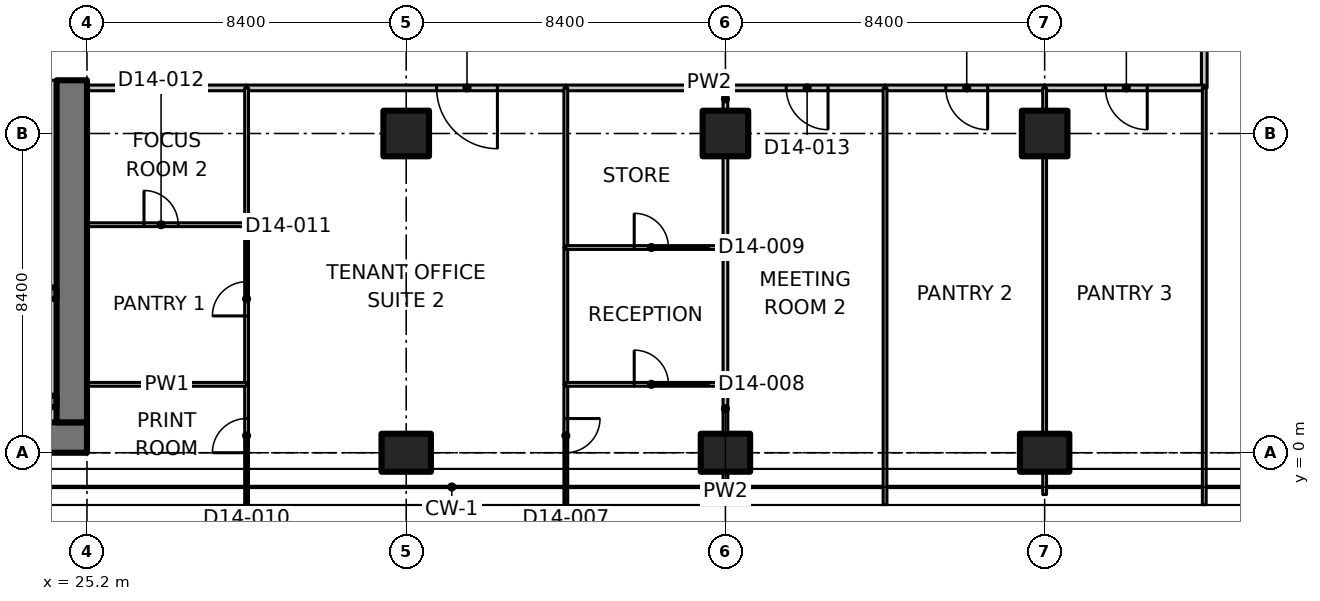
"""IFC4 building model, lengths in metres.
Left out: names, types, materials, properties, quantities, classifications, styles, units other than length and angle.
Written with IfcOpenShell. Run it as: python <this file> out.ifc"""

import sys

from ifc_helpers import new_model, si_unit, direction, frame, frame_2d, origin, origin_2d, place, context, subcontext, project, spatial, polyline, rectangle, outline, extrude, element, fill, save


model = new_model("IFC4")
c1 = context("Model", 3, precision=1e-05, world=origin(), true_north=direction((0.0, 1.0)))
c2 = subcontext(c1, "Body", "Model", "MODEL_VIEW")
j1 = project(units=[si_unit("LENGTHUNIT", "METRE"), si_unit("PLANEANGLEUNIT", "RADIAN")], contexts=[c1])
p1 = place(None, origin())
s1 = spatial("IfcSite", under=j1, at=p1, CompositionType="ELEMENT")
p2 = place(p1, origin())
s2 = spatial("IfcBuilding", under=s1, at=p2, CompositionType="ELEMENT")
p3 = place(p2, frame((0.0, 0.0, 109.7)))
s3 = spatial("IfcBuildingStorey", under=s2, at=p3, CompositionType="ELEMENT", Elevation=109.7)
p4 = place(p3, frame((33.6, 0.0, 0.0), z_axis=(0.0, 0.0, 1.0), x_axis=(0.0, 1.0, 0.0)))
e1 = element("IfcColumn", 1, at=p4, inside=s3, PredefinedType="COLUMN", context=c2, shape_type="SweptSolid", body=[
    extrude(rectangle(XDim=1.0, YDim=1.3, at=origin_2d()), origin(), (0.0, 0.0, 1.0), 3.35),
])
p5 = place(p3, frame((33.6, 8.4, 0.0), z_axis=(0.0, 0.0, 1.0), x_axis=(1.0, 0.0, 0.0)))
e2 = element("IfcColumn", 2, at=p5, inside=s3, PredefinedType="COLUMN", context=c2, shape_type="SweptSolid", body=[
    extrude(rectangle(XDim=1.2, YDim=1.2, at=origin_2d()), origin(), (0.0, 0.0, 1.0), 3.35),
])
p6 = place(p3, frame((42.0, 0.0, 0.0), z_axis=(0.0, 0.0, 1.0), x_axis=(0.0, 1.0, 0.0)))
e3 = element("IfcColumn", 3, at=p6, inside=s3, PredefinedType="COLUMN", context=c2, shape_type="SweptSolid", body=[
    extrude(rectangle(XDim=1.0, YDim=1.3, at=origin_2d()), origin(), (0.0, 0.0, 1.0), 3.35),
])
p7 = place(p3, frame((42.0, 8.4, 0.0), z_axis=(0.0, 0.0, 1.0), x_axis=(1.0, 0.0, 0.0)))
e4 = element("IfcColumn", 4, at=p7, inside=s3, PredefinedType="COLUMN", context=c2, shape_type="SweptSolid", body=[
    extrude(rectangle(XDim=1.2, YDim=1.2, at=origin_2d()), origin(), (0.0, 0.0, 1.0), 3.35),
])
p8 = place(p3, frame((50.4, 0.0, 0.0), z_axis=(0.0, 0.0, 1.0), x_axis=(0.0, 1.0, 0.0)))
e5 = element("IfcColumn", 5, at=p8, inside=s3, PredefinedType="COLUMN", context=c2, shape_type="SweptSolid", body=[
    extrude(rectangle(XDim=1.0, YDim=1.3, at=origin_2d()), origin(), (0.0, 0.0, 1.0), 3.35),
])
p9 = place(p3, frame((50.4, 8.4, 0.0), z_axis=(0.0, 0.0, 1.0), x_axis=(1.0, 0.0, 0.0)))
e6 = element("IfcColumn", 6, at=p9, inside=s3, PredefinedType="COLUMN", context=c2, shape_type="SweptSolid", body=[
    extrude(rectangle(XDim=1.2, YDim=1.2, at=origin_2d()), origin(), (0.0, 0.0, 1.0), 3.35),
])
p10 = place(p3, frame((7.136, 0.4, 0.0), z_axis=(0.0, 0.0, 1.0), x_axis=(1.0, 0.0, 0.0)))
e7 = element("IfcWall", 7, at=p10, inside=s3, PredefinedType="SHEAR", context=c2, shape_type="SweptSolid", body=[
    extrude(rectangle(XDim=18.063, YDim=0.8, at=frame_2d((9.032, 0.0))), origin(), (0.0, 0.0, 1.0), 3.35),
])
p11 = place(p3, frame((24.8, 0.8, 0.0), z_axis=(0.0, 0.0, 1.0), x_axis=(0.0, 1.0, 0.0)))
e8 = element("IfcWall", 8, at=p11, inside=s3, PredefinedType="SHEAR", context=c2, shape_type="SweptSolid", body=[
    extrude(rectangle(XDim=9.0, YDim=0.8, at=frame_2d((4.5, 0.0))), origin(), (0.0, 0.0, 1.0), 3.35),
])
p12 = place(p3, frame((15.8, 1.35, 0.0), z_axis=(0.0, 0.0, 1.0), x_axis=(1.0, 0.0, 0.0)))
e9 = element("IfcWall", 9, at=p12, inside=s3, PredefinedType="SHEAR", context=c2, shape_type="SweptSolid", body=[
    extrude(rectangle(XDim=8.6, YDim=0.3, at=frame_2d((4.3, 0.0))), origin(), (0.0, 0.0, 1.0), 3.35),
])
p13 = place(p3, frame((15.8, 4.2, 0.0), z_axis=(0.0, 0.0, 1.0), x_axis=(1.0, 0.0, 0.0)))
e10 = element("IfcWall", 10, at=p13, inside=s3, PredefinedType="SHEAR", context=c2, shape_type="SweptSolid", body=[
    extrude(rectangle(XDim=8.6, YDim=0.3, at=frame_2d((4.3, 0.0))), origin(), (0.0, 0.0, 1.0), 3.35),
])
p14 = place(p13, frame((0.4, 0.0, 0.0)))
e11 = element("IfcOpeningElement", 11, at=p14, cuts=e10, PredefinedType="OPENING", context=c2, shape_type="SweptSolid", body=[
    extrude(rectangle(XDim=1.0, YDim=2.1, at=frame_2d((0.5, 1.05))), frame((0.0, 0.16, 0.0), z_axis=(0.0, -1.0, 0.0), x_axis=(1.0, 0.0, 0.0)), (0.0, 0.0, 1.0), 0.32),
])
p15 = place(p3, frame((13.35, 1.0, 0.0), z_axis=(0.0, 0.0, 1.0), x_axis=(1.0, 0.0, 0.0)))
e12 = element("IfcWall", 12, at=p15, inside=s3, PredefinedType="PARTITIONING", context=c2, shape_type="SweptSolid", body=[
    extrude(rectangle(XDim=11.05, YDim=0.4, at=frame_2d((5.525, 0.0))), origin(), (0.0, 0.0, 1.0), 3.35),
])
p16 = place(p3, frame((24.2, 1.5, 0.0), z_axis=(0.0, 0.0, 1.0), x_axis=(0.0, 1.0, 0.0)))
e13 = element("IfcWall", 13, at=p16, inside=s3, PredefinedType="PARTITIONING", context=c2, shape_type="SweptSolid", body=[
    extrude(rectangle(XDim=2.55, YDim=0.4, at=frame_2d((1.275, 0.0))), origin(), (0.0, 0.0, 1.0), 3.35),
])
p17 = place(p3, frame((24.2, 4.35, 0.0), z_axis=(0.0, 0.0, 1.0), x_axis=(0.0, 1.0, 0.0)))
e14 = element("IfcWall", 14, at=p17, inside=s3, PredefinedType="PARTITIONING", context=c2, shape_type="SweptSolid", body=[
    extrude(rectangle(XDim=5.45, YDim=0.4, at=frame_2d((2.725, 0.0))), origin(), (0.0, 0.0, 1.0), 3.35),
])
p18 = place(p3, frame((29.4, 9.6, 0.0), z_axis=(0.0, 0.0, 1.0), x_axis=(-1.0, 0.0, 0.0)))
e15 = element("IfcWall", 15, at=p18, inside=s3, PredefinedType="PARTITIONING", context=c2, shape_type="SweptSolid", body=[
    extrude(rectangle(XDim=4.2, YDim=0.15, at=frame_2d((2.1, 0.0))), origin(), (0.0, 0.0, 1.0), 3.33),
])
p19 = place(p3, frame((54.6, 13.0, 0.0), z_axis=(0.0, 0.0, 1.0), x_axis=(0.0, -1.0, 0.0)))
e16 = element("IfcWall", 16, at=p19, inside=s3, PredefinedType="PARTITIONING", context=c2, shape_type="SweptSolid", body=[
    extrude(rectangle(XDim=3.4, YDim=0.15, at=frame_2d((1.7, 0.0))), origin(), (0.0, 0.0, 1.0), 3.33),
])
p20 = place(p3, frame((37.8, 9.6, 0.0), z_axis=(0.0, 0.0, 1.0), x_axis=(-1.0, 0.0, 0.0)))
e17 = element("IfcWall", 17, at=p20, inside=s3, PredefinedType="PARTITIONING", context=c2, shape_type="SweptSolid", body=[
    extrude(rectangle(XDim=8.4, YDim=0.15, at=frame_2d((4.2, 0.0))), origin(), (0.0, 0.0, 1.0), 3.33),
])
p21 = place(p20, frame((1.8, 0.0, 0.0)))
e18 = element("IfcOpeningElement", 18, at=p21, cuts=e17, PredefinedType="OPENING", context=c2, shape_type="SweptSolid", body=[
    extrude(rectangle(XDim=1.6, YDim=2.1, at=frame_2d((0.8, 1.05))), frame((0.0, 0.085, 0.0), z_axis=(0.0, -1.0, 0.0), x_axis=(1.0, 0.0, 0.0)), (0.0, 0.0, 1.0), 0.17),
])
p22 = place(p3, frame((42.0, 9.6, 0.0), z_axis=(0.0, 0.0, 1.0), x_axis=(-1.0, 0.0, 0.0)))
e19 = element("IfcWall", 19, at=p22, inside=s3, PredefinedType="PARTITIONING", context=c2, shape_type="SweptSolid", body=[
    extrude(rectangle(XDim=4.2, YDim=0.15, at=frame_2d((2.1, 0.0))), origin(), (0.0, 0.0, 1.0), 3.33),
])
p23 = place(p3, frame((46.2, 9.6, 0.0), z_axis=(0.0, 0.0, 1.0), x_axis=(-1.0, 0.0, 0.0)))
e20 = element("IfcWall", 20, at=p23, inside=s3, PredefinedType="PARTITIONING", context=c2, shape_type="SweptSolid", body=[
    extrude(rectangle(XDim=4.2, YDim=0.15, at=frame_2d((2.1, 0.0))), origin(), (0.0, 0.0, 1.0), 3.33),
])
p24 = place(p23, frame((1.5, 0.0, 0.0)))
e21 = element("IfcOpeningElement", 21, at=p24, cuts=e20, PredefinedType="OPENING", context=c2, shape_type="SweptSolid", body=[
    extrude(rectangle(XDim=1.1, YDim=2.1, at=frame_2d((0.55, 1.05))), frame((0.0, 0.085, 0.0), z_axis=(0.0, -1.0, 0.0), x_axis=(1.0, 0.0, 0.0)), (0.0, 0.0, 1.0), 0.17),
])
p25 = place(p3, frame((50.4, 9.6, 0.0), z_axis=(0.0, 0.0, 1.0), x_axis=(-1.0, 0.0, 0.0)))
e22 = element("IfcWall", 22, at=p25, inside=s3, PredefinedType="PARTITIONING", context=c2, shape_type="SweptSolid", body=[
    extrude(rectangle(XDim=4.2, YDim=0.15, at=frame_2d((2.1, 0.0))), origin(), (0.0, 0.0, 1.0), 3.33),
])
p26 = place(p25, frame((1.5, 0.0, 0.0)))
e23 = element("IfcOpeningElement", 23, at=p26, cuts=e22, PredefinedType="OPENING", context=c2, shape_type="SweptSolid", body=[
    extrude(rectangle(XDim=1.1, YDim=2.1, at=frame_2d((0.55, 1.05))), frame((0.0, 0.085, 0.0), z_axis=(0.0, -1.0, 0.0), x_axis=(1.0, 0.0, 0.0)), (0.0, 0.0, 1.0), 0.17),
])
p27 = place(p3, frame((54.6, 9.6, 0.0), z_axis=(0.0, 0.0, 1.0), x_axis=(-1.0, 0.0, 0.0)))
e24 = element("IfcWall", 24, at=p27, inside=s3, PredefinedType="PARTITIONING", context=c2, shape_type="SweptSolid", body=[
    extrude(rectangle(XDim=4.2, YDim=0.15, at=frame_2d((2.1, 0.0))), origin(), (0.0, 0.0, 1.0), 3.33),
])
p28 = place(p27, frame((1.5, 0.0, 0.0)))
e25 = element("IfcOpeningElement", 25, at=p28, cuts=e24, PredefinedType="OPENING", context=c2, shape_type="SweptSolid", body=[
    extrude(rectangle(XDim=1.1, YDim=2.1, at=frame_2d((0.55, 1.05))), frame((0.0, 0.085, 0.0), z_axis=(0.0, -1.0, 0.0), x_axis=(1.0, 0.0, 0.0)), (0.0, 0.0, 1.0), 0.17),
])
p29 = place(p3, frame((54.6, -1.365, 0.0), z_axis=(0.0, 0.0, 1.0), x_axis=(0.0, 1.0, 0.0)))
e26 = element("IfcWall", 26, at=p29, inside=s3, PredefinedType="PARTITIONING", context=c2, shape_type="SweptSolid", body=[
    extrude(outline(polyline([(0.0, 0.0), (10.965, 0.0), (10.965, 3.33), (1.815, 3.33), (1.813, 2.98), (0.917, 2.98), (0.915, 3.33), (0.265, 3.33), (0.0, 3.33), (0.0, 0.0)])), frame((0.0, 0.05, 0.0), z_axis=(0.0, -1.0, 0.0), x_axis=(1.0, 0.0, 0.0)), (0.0, 0.0, 1.0), 0.1),
])
p30 = place(p3, frame((37.8, 1.8, 0.0), z_axis=(0.0, 0.0, 1.0), x_axis=(0.0, -1.0, 0.0)))
e27 = element("IfcWall", 27, at=p30, inside=s3, PredefinedType="PARTITIONING", context=c2, shape_type="SweptSolid", body=[
    extrude(rectangle(XDim=3.165, YDim=0.1, at=frame_2d((1.583, 0.0))), origin(), (0.0, 0.0, 1.0), 2.98),
])
p31 = place(p30, frame((0.9, 0.0, 0.0)))
e28 = element("IfcOpeningElement", 28, at=p31, cuts=e27, PredefinedType="OPENING", context=c2, shape_type="SweptSolid", body=[
    extrude(rectangle(XDim=0.9, YDim=2.1, at=frame_2d((0.45, 1.05))), frame((0.0, 0.06, 0.0), z_axis=(0.0, -1.0, 0.0), x_axis=(1.0, 0.0, 0.0)), (0.0, 0.0, 1.0), 0.12),
])
p32 = place(p3, frame((37.8, 5.4, 0.0), z_axis=(0.0, 0.0, 1.0), x_axis=(0.0, -1.0, 0.0)))
e29 = element("IfcWall", 29, at=p32, inside=s3, PredefinedType="PARTITIONING", context=c2, shape_type="SweptSolid", body=[
    extrude(rectangle(XDim=3.6, YDim=0.1, at=frame_2d((1.8, 0.0))), origin(), (0.0, 0.0, 1.0), 3.33),
])
p33 = place(p3, frame((37.8, 9.6, 0.0), z_axis=(0.0, 0.0, 1.0), x_axis=(0.0, -1.0, 0.0)))
e30 = element("IfcWall", 30, at=p33, inside=s3, PredefinedType="PARTITIONING", context=c2, shape_type="SweptSolid", body=[
    extrude(rectangle(XDim=4.2, YDim=0.1, at=frame_2d((2.1, 0.0))), origin(), (0.0, 0.0, 1.0), 3.33),
])
p34 = place(p3, frame((29.4, -1.365, 0.0), z_axis=(0.0, 0.0, 1.0), x_axis=(0.0, 1.0, 0.0)))
e31 = element("IfcWall", 31, at=p34, inside=s3, PredefinedType="PARTITIONING", context=c2, shape_type="SweptSolid", body=[
    extrude(rectangle(XDim=3.165, YDim=0.1, at=frame_2d((1.583, 0.0))), origin(), (0.0, 0.0, 1.0), 2.98),
])
p35 = place(p34, frame((1.365, 0.0, 0.0)))
e32 = element("IfcOpeningElement", 32, at=p35, cuts=e31, PredefinedType="OPENING", context=c2, shape_type="SweptSolid", body=[
    extrude(rectangle(XDim=0.9, YDim=2.1, at=frame_2d((0.45, 1.05))), frame((0.0, 0.06, 0.0), z_axis=(0.0, -1.0, 0.0), x_axis=(1.0, 0.0, 0.0)), (0.0, 0.0, 1.0), 0.12),
])
p36 = place(p3, frame((29.4, 1.8, 0.0), z_axis=(0.0, 0.0, 1.0), x_axis=(0.0, 1.0, 0.0)))
e33 = element("IfcWall", 33, at=p36, inside=s3, PredefinedType="PARTITIONING", context=c2, shape_type="SweptSolid", body=[
    extrude(rectangle(XDim=4.2, YDim=0.1, at=frame_2d((2.1, 0.0))), origin(), (0.0, 0.0, 1.0), 3.33),
])
p37 = place(p36, frame((1.8, 0.0, 0.0)))
e34 = element("IfcOpeningElement", 34, at=p37, cuts=e33, PredefinedType="OPENING", context=c2, shape_type="SweptSolid", body=[
    extrude(rectangle(XDim=0.9, YDim=2.1, at=frame_2d((0.45, 1.05))), frame((0.0, 0.06, 0.0), z_axis=(0.0, -1.0, 0.0), x_axis=(1.0, 0.0, 0.0)), (0.0, 0.0, 1.0), 0.12),
])
p38 = place(p3, frame((29.4, 6.0, 0.0), z_axis=(0.0, 0.0, 1.0), x_axis=(0.0, 1.0, 0.0)))
e35 = element("IfcWall", 35, at=p38, inside=s3, PredefinedType="PARTITIONING", context=c2, shape_type="SweptSolid", body=[
    extrude(rectangle(XDim=3.6, YDim=0.1, at=frame_2d((1.8, 0.0))), origin(), (0.0, 0.0, 1.0), 3.33),
])
p39 = place(p3, frame((37.8, 1.8, 0.0), z_axis=(0.0, 0.0, 1.0), x_axis=(1.0, 0.0, 0.0)))
e36 = element("IfcWall", 36, at=p39, inside=s3, PredefinedType="PARTITIONING", context=c2, shape_type="SweptSolid", body=[
    extrude(rectangle(XDim=4.2, YDim=0.1, at=frame_2d((2.1, 0.0))), origin(), (0.0, 0.0, 1.0), 3.33),
])
p40 = place(p39, frame((1.8, 0.0, 0.0)))
e37 = element("IfcOpeningElement", 37, at=p40, cuts=e36, PredefinedType="OPENING", context=c2, shape_type="SweptSolid", body=[
    extrude(rectangle(XDim=0.9, YDim=2.1, at=frame_2d((0.45, 1.05))), frame((0.0, 0.06, 0.0), z_axis=(0.0, -1.0, 0.0), x_axis=(1.0, 0.0, 0.0)), (0.0, 0.0, 1.0), 0.12),
])
p41 = place(p3, frame((42.0, 1.8, 0.0), z_axis=(0.0, 0.0, 1.0), x_axis=(0.0, -1.0, 0.0)))
e38 = element("IfcWall", 38, at=p41, inside=s3, PredefinedType="PARTITIONING", context=c2, shape_type="SweptSolid", body=[
    extrude(rectangle(XDim=1.28, YDim=0.125, at=frame_2d((0.64, 0.0))), origin(), (0.0, 0.0, 1.0), 3.33),
])
p42 = place(p3, frame((42.0, -0.52, 0.0), z_axis=(0.0, 0.0, 1.0), x_axis=(0.0, -1.0, 0.0)))
e39 = element("IfcWall", 39, at=p42, inside=s3, PredefinedType="PARTITIONING", context=c2, shape_type="SweptSolid", body=[
    extrude(rectangle(XDim=0.58, YDim=0.125, at=frame_2d((0.29, 0.0))), origin(), (0.0, 0.0, 1.0), 3.33),
])
p43 = place(p3, frame((37.8, 5.4, 0.0), z_axis=(0.0, 0.0, 1.0), x_axis=(1.0, 0.0, 0.0)))
e40 = element("IfcWall", 40, at=p43, inside=s3, PredefinedType="PARTITIONING", context=c2, shape_type="SweptSolid", body=[
    extrude(rectangle(XDim=4.2, YDim=0.1, at=frame_2d((2.1, 0.0))), origin(), (0.0, 0.0, 1.0), 3.33),
])
p44 = place(p43, frame((1.8, 0.0, 0.0)))
e41 = element("IfcOpeningElement", 41, at=p44, cuts=e40, PredefinedType="OPENING", context=c2, shape_type="SweptSolid", body=[
    extrude(rectangle(XDim=0.9, YDim=2.1, at=frame_2d((0.45, 1.05))), frame((0.0, 0.06, 0.0), z_axis=(0.0, -1.0, 0.0), x_axis=(1.0, 0.0, 0.0)), (0.0, 0.0, 1.0), 0.12),
])
p45 = place(p3, frame((42.0, 5.4, 0.0), z_axis=(0.0, 0.0, 1.0), x_axis=(0.0, -1.0, 0.0)))
e42 = element("IfcWall", 42, at=p45, inside=s3, PredefinedType="PARTITIONING", context=c2, shape_type="SweptSolid", body=[
    extrude(rectangle(XDim=3.6, YDim=0.125, at=frame_2d((1.8, 0.0))), origin(), (0.0, 0.0, 1.0), 3.33),
])
p46 = place(p3, frame((42.0, 9.6, 0.0), z_axis=(0.0, 0.0, 1.0), x_axis=(0.0, -1.0, 0.0)))
e43 = element("IfcWall", 43, at=p46, inside=s3, PredefinedType="PARTITIONING", context=c2, shape_type="SweptSolid", body=[
    extrude(rectangle(XDim=0.58, YDim=0.125, at=frame_2d((0.29, 0.0))), origin(), (0.0, 0.0, 1.0), 3.33),
])
p47 = place(p3, frame((42.0, 7.78, 0.0), z_axis=(0.0, 0.0, 1.0), x_axis=(0.0, -1.0, 0.0)))
e44 = element("IfcWall", 44, at=p47, inside=s3, PredefinedType="PARTITIONING", context=c2, shape_type="SweptSolid", body=[
    extrude(rectangle(XDim=2.38, YDim=0.125, at=frame_2d((1.19, 0.0))), origin(), (0.0, 0.0, 1.0), 3.33),
])
p48 = place(p3, frame((25.2, 1.8, 0.0), z_axis=(0.0, 0.0, 1.0), x_axis=(1.0, 0.0, 0.0)))
e45 = element("IfcWall", 45, at=p48, inside=s3, PredefinedType="PARTITIONING", context=c2, shape_type="SweptSolid", body=[
    extrude(rectangle(XDim=4.2, YDim=0.1, at=frame_2d((2.1, 0.0))), origin(), (0.0, 0.0, 1.0), 3.33),
])
p49 = place(p3, frame((25.2, 6.0, 0.0), z_axis=(0.0, 0.0, 1.0), x_axis=(1.0, 0.0, 0.0)))
e46 = element("IfcWall", 46, at=p49, inside=s3, PredefinedType="PARTITIONING", context=c2, shape_type="SweptSolid", body=[
    extrude(rectangle(XDim=4.2, YDim=0.1, at=frame_2d((2.1, 0.0))), origin(), (0.0, 0.0, 1.0), 3.33),
])
p50 = place(p49, frame((1.5, 0.0, 0.0)))
e47 = element("IfcOpeningElement", 47, at=p50, cuts=e46, PredefinedType="OPENING", context=c2, shape_type="SweptSolid", body=[
    extrude(rectangle(XDim=0.9, YDim=2.1, at=frame_2d((0.45, 1.05))), frame((0.0, 0.06, 0.0), z_axis=(0.0, -1.0, 0.0), x_axis=(1.0, 0.0, 0.0)), (0.0, 0.0, 1.0), 0.12),
])
p51 = place(p3, frame((46.2, 9.6, 0.0), z_axis=(0.0, 0.0, 1.0), x_axis=(0.0, -1.0, 0.0)))
e48 = element("IfcWall", 48, at=p51, inside=s3, PredefinedType="PARTITIONING", context=c2, shape_type="SweptSolid", body=[
    extrude(outline(polyline([(0.0, 0.0), (10.965, 0.0), (10.965, 3.33), (10.7, 3.33), (10.05, 3.33), (10.048, 2.98), (9.152, 2.98), (9.15, 3.33), (0.0, 3.33), (0.0, 0.0)])), frame((0.0, 0.05, 0.0), z_axis=(0.0, -1.0, 0.0), x_axis=(1.0, 0.0, 0.0)), (0.0, 0.0, 1.0), 0.1),
])
p52 = place(p3, frame((50.4, 9.6, 0.0), z_axis=(0.0, 0.0, 1.0), x_axis=(0.0, -1.0, 0.0)))
e49 = element("IfcWall", 49, at=p52, inside=s3, PredefinedType="PARTITIONING", context=c2, shape_type="SweptSolid", body=[
    extrude(rectangle(XDim=0.58, YDim=0.1, at=frame_2d((0.29, 0.0))), origin(), (0.0, 0.0, 1.0), 3.33),
])
p53 = place(p3, frame((50.4, 7.78, 0.0), z_axis=(0.0, 0.0, 1.0), x_axis=(0.0, -1.0, 0.0)))
e50 = element("IfcWall", 50, at=p53, inside=s3, PredefinedType="PARTITIONING", context=c2, shape_type="SweptSolid", body=[
    extrude(rectangle(XDim=7.26, YDim=0.1, at=frame_2d((3.63, 0.0))), origin(), (0.0, 0.0, 1.0), 3.33),
])
p54 = place(p3, frame((50.4, -0.52, 0.0), z_axis=(0.0, 0.0, 1.0), x_axis=(0.0, -1.0, 0.0)))
e51 = element("IfcWall", 51, at=p54, inside=s3, PredefinedType="PARTITIONING", context=c2, shape_type="SweptSolid", body=[
    extrude(rectangle(XDim=0.58, YDim=0.1, at=frame_2d((0.29, 0.0))), origin(), (0.0, 0.0, 1.0), 3.33),
])
p55 = place(p21, origin())
e52 = element("IfcDoor", 52, at=p55, inside=s3, OperationType="DOUBLE_DOOR_SINGLE_SWING", PredefinedType="DOOR", context=c2, shape_type="SweptSolid", body=[
    extrude(rectangle(XDim=1.6, YDim=2.1, at=frame_2d((0.8, 1.05))), frame((0.0, 0.025, 0.0), z_axis=(0.0, -1.0, 0.0), x_axis=(1.0, 0.0, 0.0)), (0.0, 0.0, 1.0), 0.05),
])
fill(e18, e52)
p56 = place(p31, origin())
e53 = element("IfcDoor", 53, at=p56, inside=s3, OperationType="SINGLE_SWING_LEFT", PredefinedType="DOOR", context=c2, shape_type="SweptSolid", body=[
    extrude(rectangle(XDim=0.9, YDim=2.1, at=frame_2d((0.45, 1.05))), frame((0.0, 0.025, 0.0), z_axis=(0.0, -1.0, 0.0), x_axis=(1.0, 0.0, 0.0)), (0.0, 0.0, 1.0), 0.05),
])
fill(e28, e53)
p57 = place(p40, origin())
e54 = element("IfcDoor", 54, at=p57, inside=s3, OperationType="SINGLE_SWING_LEFT", PredefinedType="DOOR", context=c2, shape_type="SweptSolid", body=[
    extrude(rectangle(XDim=0.9, YDim=2.1, at=frame_2d((0.45, 1.05))), frame((0.0, 0.025, 0.0), z_axis=(0.0, -1.0, 0.0), x_axis=(1.0, 0.0, 0.0)), (0.0, 0.0, 1.0), 0.05),
])
fill(e37, e54)
p58 = place(p44, origin())
e55 = element("IfcDoor", 55, at=p58, inside=s3, OperationType="SINGLE_SWING_LEFT", PredefinedType="DOOR", context=c2, shape_type="SweptSolid", body=[
    extrude(rectangle(XDim=0.9, YDim=2.1, at=frame_2d((0.45, 1.05))), frame((0.0, 0.025, 0.0), z_axis=(0.0, -1.0, 0.0), x_axis=(1.0, 0.0, 0.0)), (0.0, 0.0, 1.0), 0.05),
])
fill(e41, e55)
p59 = place(p35, origin())
e56 = element("IfcDoor", 56, at=p59, inside=s3, OperationType="SINGLE_SWING_LEFT", PredefinedType="DOOR", context=c2, shape_type="SweptSolid", body=[
    extrude(rectangle(XDim=0.9, YDim=2.1, at=frame_2d((0.45, 1.05))), frame((0.0, 0.025, 0.0), z_axis=(0.0, -1.0, 0.0), x_axis=(1.0, 0.0, 0.0)), (0.0, 0.0, 1.0), 0.05),
])
fill(e32, e56)
p60 = place(p37, origin())
e57 = element("IfcDoor", 57, at=p60, inside=s3, OperationType="SINGLE_SWING_LEFT", PredefinedType="DOOR", context=c2, shape_type="SweptSolid", body=[
    extrude(rectangle(XDim=0.9, YDim=2.1, at=frame_2d((0.45, 1.05))), frame((0.0, 0.025, 0.0), z_axis=(0.0, -1.0, 0.0), x_axis=(1.0, 0.0, 0.0)), (0.0, 0.0, 1.0), 0.05),
])
fill(e34, e57)
p61 = place(p50, origin())
e58 = element("IfcDoor", 58, at=p61, inside=s3, OperationType="SINGLE_SWING_LEFT", PredefinedType="DOOR", context=c2, shape_type="SweptSolid", body=[
    extrude(rectangle(XDim=0.9, YDim=2.1, at=frame_2d((0.45, 1.05))), frame((0.0, 0.025, 0.0), z_axis=(0.0, -1.0, 0.0), x_axis=(1.0, 0.0, 0.0)), (0.0, 0.0, 1.0), 0.05),
])
fill(e47, e58)
p62 = place(p24, origin())
e59 = element("IfcDoor", 59, at=p62, inside=s3, OperationType="SINGLE_SWING_LEFT", PredefinedType="DOOR", context=c2, shape_type="SweptSolid", body=[
    extrude(rectangle(XDim=1.1, YDim=2.1, at=frame_2d((0.55, 1.05))), frame((0.0, 0.025, 0.0), z_axis=(0.0, -1.0, 0.0), x_axis=(1.0, 0.0, 0.0)), (0.0, 0.0, 1.0), 0.05),
])
fill(e21, e59)
p63 = place(p26, origin())
e60 = element("IfcDoor", 60, at=p63, inside=s3, OperationType="SINGLE_SWING_LEFT", PredefinedType="DOOR", context=c2, shape_type="SweptSolid", body=[
    extrude(rectangle(XDim=1.1, YDim=2.1, at=frame_2d((0.55, 1.05))), frame((0.0, 0.025, 0.0), z_axis=(0.0, -1.0, 0.0), x_axis=(1.0, 0.0, 0.0)), (0.0, 0.0, 1.0), 0.05),
])
fill(e23, e60)
p64 = place(p28, origin())
e61 = element("IfcDoor", 61, at=p64, inside=s3, OperationType="SINGLE_SWING_LEFT", PredefinedType="DOOR", context=c2, shape_type="SweptSolid", body=[
    extrude(rectangle(XDim=1.1, YDim=2.1, at=frame_2d((0.55, 1.05))), frame((0.0, 0.025, 0.0), z_axis=(0.0, -1.0, 0.0), x_axis=(1.0, 0.0, 0.0)), (0.0, 0.0, 1.0), 0.05),
])
fill(e25, e61)
save(model, sys.argv[1])
